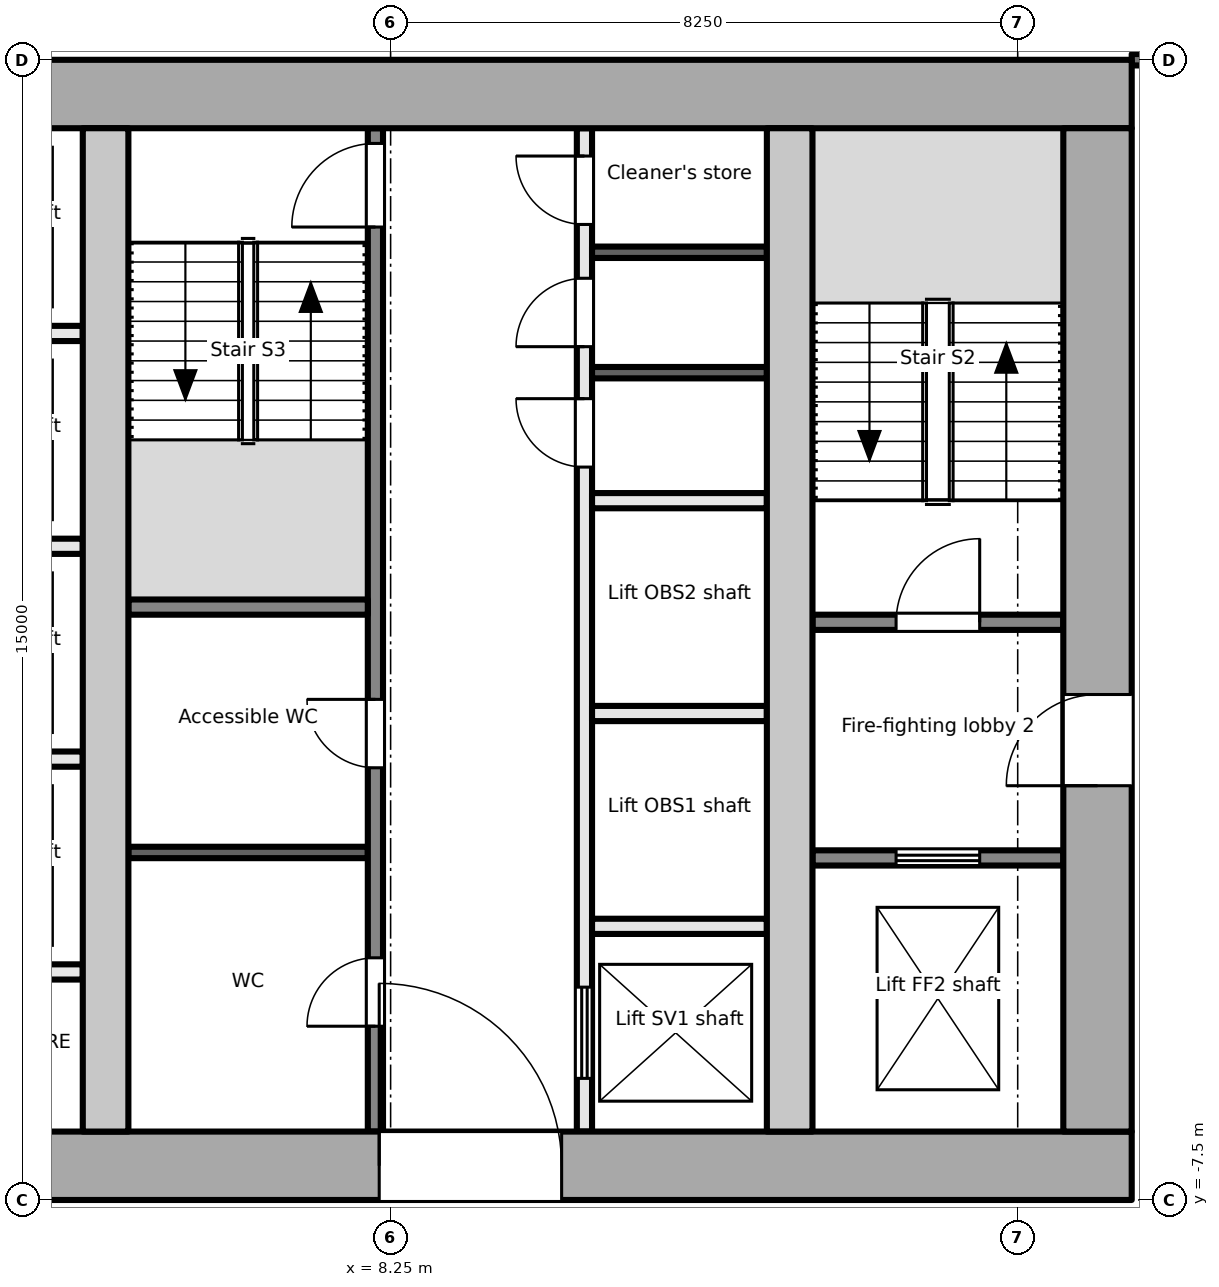
"""IFC4 building model, lengths in metres.
Left out: names, types, materials, properties, quantities, classifications, styles, units other than length and angle.
Written with IfcOpenShell. Run it as: python <this file> out.ifc"""

import sys

from ifc_helpers import new_model, si_unit, direction, frame, frame_2d, origin, place, context, subcontext, project, spatial, rectangle, extrude, element, fill, save


model = new_model("IFC4")
c1 = context("Model", 3, precision=1e-05, world=origin(), true_north=direction((0.0, 1.0)))
c2 = subcontext(c1, "Body", "Model", "MODEL_VIEW")
j1 = project(units=[si_unit("LENGTHUNIT", "METRE"), si_unit("PLANEANGLEUNIT", "RADIAN")], contexts=[c1])
p1 = place(None, origin())
s1 = spatial("IfcSite", under=j1, at=p1, CompositionType="ELEMENT")
p2 = place(p1, origin())
s2 = spatial("IfcBuilding", under=s1, at=p2, CompositionType="ELEMENT")
p3 = place(p2, frame((0.0, 0.0, 217.4)))
s3 = spatial("IfcBuildingStorey", under=s2, at=p3, CompositionType="ELEMENT", Elevation=217.4)
p4 = place(p3, frame((-18.0, -7.05, -0.2), z_axis=(0.0, 0.0, 1.0), x_axis=(1.0, 0.0, 0.0)))
e1 = element("IfcWall", 1, at=p4, inside=s3, PredefinedType="SHEAR", context=c2, shape_type="SweptSolid", body=[
    extrude(rectangle(XDim=36.0, YDim=0.9, at=frame_2d((18.0, 0.0))), origin(), (0.0, 0.0, 1.0), 3.9),
])
p5 = place(p4, frame((4.9, 0.0, 0.2)))
e2 = element("IfcOpeningElement", 2, at=p5, cuts=e1, PredefinedType="OPENING", context=c2, shape_type="SweptSolid", body=[
    extrude(rectangle(XDim=1.8, YDim=2.1, at=frame_2d((0.9, 1.05))), frame((0.0, 0.46, 0.0), z_axis=(0.0, -1.0, 0.0), x_axis=(1.0, 0.0, 0.0)), (0.0, 0.0, 1.0), 0.921),
])
p6 = place(p4, frame((16.8, 0.0, 0.2)))
e3 = element("IfcOpeningElement", 3, at=p6, cuts=e1, PredefinedType="OPENING", context=c2, shape_type="SweptSolid", body=[
    extrude(rectangle(XDim=2.4, YDim=2.1, at=frame_2d((1.2, 1.05))), frame((0.0, 0.46, 0.0), z_axis=(0.0, -1.0, 0.0), x_axis=(1.0, 0.0, 0.0)), (0.0, 0.0, 1.0), 0.921),
])
p7 = place(p4, frame((26.1, 0.0, 0.2)))
e4 = element("IfcOpeningElement", 4, at=p7, cuts=e1, PredefinedType="OPENING", context=c2, shape_type="SweptSolid", body=[
    extrude(rectangle(XDim=2.4, YDim=2.1, at=frame_2d((1.2, 1.05))), frame((0.0, 0.46, 0.0), z_axis=(0.0, -1.0, 0.0), x_axis=(1.0, 0.0, 0.0)), (0.0, 0.0, 1.0), 0.921),
])
p8 = place(p3, frame((-18.0, 7.05, -0.2), z_axis=(0.0, 0.0, 1.0), x_axis=(1.0, 0.0, 0.0)))
e5 = element("IfcWall", 5, at=p8, inside=s3, PredefinedType="SHEAR", context=c2, shape_type="SweptSolid", body=[
    extrude(rectangle(XDim=36.0, YDim=0.9, at=frame_2d((18.0, 0.0))), origin(), (0.0, 0.0, 1.0), 3.9),
])
p9 = place(p3, frame((17.55, -6.6, -0.2), z_axis=(0.0, 0.0, 1.0), x_axis=(0.0, 1.0, 0.0)))
e6 = element("IfcWall", 6, at=p9, inside=s3, PredefinedType="SHEAR", context=c2, shape_type="SweptSolid", body=[
    extrude(rectangle(XDim=13.2, YDim=0.9, at=frame_2d((6.6, 0.0))), origin(), (0.0, 0.0, 1.0), 3.9),
])
p10 = place(p9, frame((4.55, 0.0, 0.2)))
e7 = element("IfcOpeningElement", 7, at=p10, cuts=e6, PredefinedType="OPENING", context=c2, shape_type="SweptSolid", body=[
    extrude(rectangle(XDim=1.2, YDim=2.1, at=frame_2d((0.6, 1.05))), frame((0.0, 0.46, 0.0), z_axis=(0.0, -1.0, 0.0), x_axis=(1.0, 0.0, 0.0)), (0.0, 0.0, 1.0), 0.921),
])
for number, where, z_axis, x_axis in (
    (8, (4.5, -6.6, -0.2), (0.0, 0.0, 1.0), (0.0, 1.0, 0.0)),
    (9, (13.5, -6.6, -0.2), (0.0, 0.0, 1.0), (0.0, 1.0, 0.0)),
):
    element("IfcWall", number, at=place(p3, frame(where, z_axis=z_axis, x_axis=x_axis)), inside=s3, PredefinedType="SHEAR", context=c2, shape_type="SweptSolid", body=[
        extrude(rectangle(XDim=13.2, YDim=0.6, at=frame_2d((6.6, 0.0))), origin(), (0.0, 0.0, 1.0), 3.9),
    ])
p11 = place(p3, frame((13.8, -3.0, 0.0), z_axis=(0.0, 0.0, 1.0), x_axis=(1.0, 0.0, 0.0)))
e10 = element("IfcWall", 10, at=p11, inside=s3, PredefinedType="PARTITIONING", context=c2, shape_type="SweptSolid", body=[
    extrude(rectangle(XDim=3.3, YDim=0.2, at=frame_2d((1.65, 0.0))), origin(), (0.0, 0.0, 1.0), 3.7),
])
p12 = place(p11, frame((1.1, 0.0, 0.0)))
e11 = element("IfcOpeningElement", 11, at=p12, cuts=e10, PredefinedType="OPENING", context=c2, shape_type="SweptSolid", body=[
    extrude(rectangle(XDim=1.1, YDim=2.1, at=frame_2d((0.55, 1.05))), frame((0.0, 0.111, 0.0), z_axis=(0.0, -1.0, 0.0), x_axis=(1.0, 0.0, 0.0)), (0.0, 0.0, 1.0), 0.221),
])
p13 = place(p3, frame((13.8, 0.1, 0.0), z_axis=(0.0, 0.0, 1.0), x_axis=(1.0, 0.0, 0.0)))
e12 = element("IfcWall", 12, at=p13, inside=s3, PredefinedType="PARTITIONING", context=c2, shape_type="SweptSolid", body=[
    extrude(rectangle(XDim=3.3, YDim=0.2, at=frame_2d((1.65, 0.0))), origin(), (0.0, 0.0, 1.0), 3.7),
])
p14 = place(p13, frame((1.1, 0.0, 0.0)))
e13 = element("IfcOpeningElement", 13, at=p14, cuts=e12, PredefinedType="OPENING", context=c2, shape_type="SweptSolid", body=[
    extrude(rectangle(XDim=1.1, YDim=2.1, at=frame_2d((0.55, 1.05))), frame((0.0, 0.111, 0.0), z_axis=(0.0, -1.0, 0.0), x_axis=(1.0, 0.0, 0.0)), (0.0, 0.0, 1.0), 0.221),
])
for number, where, z_axis, x_axis in (
    (14, (1.9, -1.7, 0.0), (0.0, 0.0, 1.0), (1.0, 0.0, 0.0)),
    (15, (1.9, 1.1, 0.0), (0.0, 0.0, 1.0), (1.0, 0.0, 0.0)),
    (16, (1.9, 3.9, 0.0), (0.0, 0.0, 1.0), (1.0, 0.0, 0.0)),
    (17, (1.9, -4.5, 0.0), (0.0, 0.0, 1.0), (1.0, 0.0, 0.0)),
):
    element("IfcWall", number, at=place(p3, frame(where, z_axis=z_axis, x_axis=x_axis)), inside=s3, PredefinedType="PARTITIONING", context=c2, shape_type="SweptSolid", body=[
        extrude(rectangle(XDim=2.3, YDim=0.2, at=frame_2d((1.15, 0.0))), origin(), (0.0, 0.0, 1.0), 3.7),
    ])
p15 = place(p3, frame((8.05, -6.6, 0.0), z_axis=(0.0, 0.0, 1.0), x_axis=(0.0, 1.0, 0.0)))
e18 = element("IfcWall", 18, at=p15, inside=s3, PredefinedType="PARTITIONING", context=c2, shape_type="SweptSolid", body=[
    extrude(rectangle(XDim=13.2, YDim=0.2, at=frame_2d((6.6, 0.0))), origin(), (0.0, 0.0, 1.0), 3.7),
])
p16 = place(p15, frame((1.386, 0.0, 0.0)))
e19 = element("IfcOpeningElement", 19, at=p16, cuts=e18, PredefinedType="OPENING", context=c2, shape_type="SweptSolid", body=[
    extrude(rectangle(XDim=0.9, YDim=2.1, at=frame_2d((0.45, 1.05))), frame((0.0, 0.111, 0.0), z_axis=(0.0, -1.0, 0.0), x_axis=(1.0, 0.0, 0.0)), (0.0, 0.0, 1.0), 0.221),
])
p17 = place(p15, frame((4.786, 0.0, 0.0)))
e20 = element("IfcOpeningElement", 20, at=p17, cuts=e18, PredefinedType="OPENING", context=c2, shape_type="SweptSolid", body=[
    extrude(rectangle(XDim=0.9, YDim=2.1, at=frame_2d((0.45, 1.05))), frame((0.0, 0.111, 0.0), z_axis=(0.0, -1.0, 0.0), x_axis=(1.0, 0.0, 0.0)), (0.0, 0.0, 1.0), 0.221),
])
p18 = place(p15, frame((11.9, 0.0, 0.0)))
e21 = element("IfcOpeningElement", 21, at=p18, cuts=e18, PredefinedType="OPENING", context=c2, shape_type="SweptSolid", body=[
    extrude(rectangle(XDim=1.1, YDim=2.1, at=frame_2d((0.55, 1.05))), frame((0.0, 0.111, 0.0), z_axis=(0.0, -1.0, 0.0), x_axis=(1.0, 0.0, 0.0)), (0.0, 0.0, 1.0), 0.221),
])
p19 = place(p3, frame((10.8, -6.6, 0.0), z_axis=(0.0, 0.0, 1.0), x_axis=(0.0, 1.0, 0.0)))
e22 = element("IfcWall", 22, at=p19, inside=s3, PredefinedType="PARTITIONING", context=c2, shape_type="SweptSolid", body=[
    extrude(rectangle(XDim=13.2, YDim=0.2, at=frame_2d((6.6, 0.0))), origin(), (0.0, 0.0, 1.0), 3.7),
])
p20 = place(p19, frame((0.7, 0.0, 0.0)))
e23 = element("IfcOpeningElement", 23, at=p20, cuts=e22, PredefinedType="OPENING", context=c2, shape_type="SweptSolid", body=[
    extrude(rectangle(XDim=1.2, YDim=2.1, at=frame_2d((0.6, 1.05))), frame((0.0, 0.111, 0.0), z_axis=(0.0, -1.0, 0.0), x_axis=(1.0, 0.0, 0.0)), (0.0, 0.0, 1.0), 0.221),
])
p21 = place(p19, frame((8.742, 0.0, 0.0)))
e24 = element("IfcOpeningElement", 24, at=p21, cuts=e22, PredefinedType="OPENING", context=c2, shape_type="SweptSolid", body=[
    extrude(rectangle(XDim=0.9, YDim=2.1, at=frame_2d((0.45, 1.05))), frame((0.0, 0.111, 0.0), z_axis=(0.0, -1.0, 0.0), x_axis=(1.0, 0.0, 0.0)), (0.0, 0.0, 1.0), 0.221),
])
p22 = place(p19, frame((10.326, 0.0, 0.0)))
e25 = element("IfcOpeningElement", 25, at=p22, cuts=e22, PredefinedType="OPENING", context=c2, shape_type="SweptSolid", body=[
    extrude(rectangle(XDim=0.9, YDim=2.1, at=frame_2d((0.45, 1.05))), frame((0.0, 0.111, 0.0), z_axis=(0.0, -1.0, 0.0), x_axis=(1.0, 0.0, 0.0)), (0.0, 0.0, 1.0), 0.221),
])
p23 = place(p19, frame((11.934, 0.0, 0.0)))
e26 = element("IfcOpeningElement", 26, at=p23, cuts=e22, PredefinedType="OPENING", context=c2, shape_type="SweptSolid", body=[
    extrude(rectangle(XDim=0.9, YDim=2.1, at=frame_2d((0.45, 1.05))), frame((0.0, 0.111, 0.0), z_axis=(0.0, -1.0, 0.0), x_axis=(1.0, 0.0, 0.0)), (0.0, 0.0, 1.0), 0.221),
])
p24 = place(p3, frame((4.8, 0.3, 0.0), z_axis=(0.0, 0.0, 1.0), x_axis=(1.0, 0.0, 0.0)))
e27 = element("IfcWall", 27, at=p24, inside=s3, PredefinedType="PARTITIONING", context=c2, shape_type="SweptSolid", body=[
    extrude(rectangle(XDim=3.15, YDim=0.2, at=frame_2d((1.575, 0.0))), origin(), (0.0, 0.0, 1.0), 3.7),
])
p25 = place(p3, frame((4.8, -2.928, 0.0), z_axis=(0.0, 0.0, 1.0), x_axis=(1.0, 0.0, 0.0)))
e28 = element("IfcWall", 28, at=p25, inside=s3, PredefinedType="PARTITIONING", context=c2, shape_type="SweptSolid", body=[
    extrude(rectangle(XDim=3.15, YDim=0.15, at=frame_2d((1.575, 0.0))), origin(), (0.0, 0.0, 1.0), 3.7),
])
for number, where, z_axis, x_axis in (
    (29, (10.9, -3.9, 0.0), (0.0, 0.0, 1.0), (1.0, 0.0, 0.0)),
    (30, (10.9, -1.1, 0.0), (0.0, 0.0, 1.0), (1.0, 0.0, 0.0)),
    (31, (10.9, 1.7, 0.0), (0.0, 0.0, 1.0), (1.0, 0.0, 0.0)),
):
    element("IfcWall", number, at=place(p3, frame(where, z_axis=z_axis, x_axis=x_axis)), inside=s3, PredefinedType="PARTITIONING", context=c2, shape_type="SweptSolid", body=[
        extrude(rectangle(XDim=2.3, YDim=0.2, at=frame_2d((1.15, 0.0))), origin(), (0.0, 0.0, 1.0), 3.7),
    ])
for number, where, z_axis, x_axis in (
    (32, (10.9, 3.384, 0.0), (0.0, 0.0, 1.0), (1.0, 0.0, 0.0)),
    (33, (10.9, 4.968, 0.0), (0.0, 0.0, 1.0), (1.0, 0.0, 0.0)),
):
    element("IfcWall", number, at=place(p3, frame(where, z_axis=z_axis, x_axis=x_axis)), inside=s3, PredefinedType="PARTITIONING", context=c2, shape_type="SweptSolid", body=[
        extrude(rectangle(XDim=2.3, YDim=0.15, at=frame_2d((1.15, 0.0))), origin(), (0.0, 0.0, 1.0), 3.7),
    ])
p26 = place(p3, frame((18.0, 7.501, 0.0), z_axis=(0.0, 0.0, 1.0), x_axis=(1.0, 0.0, 0.0)))
e34 = element("IfcWall", 34, at=p26, inside=s3, PredefinedType="PARTITIONING", context=c2, shape_type="SweptSolid", body=[
    extrude(rectangle(XDim=2.625, YDim=0.15, at=frame_2d((1.312, 0.0))), origin(), (0.0, 0.0, 1.0), 3.7),
])
p27 = place(p12, origin())
e35 = element("IfcDoor", 35, at=p27, inside=s3, OperationType="DOUBLE_DOOR_SLIDING", PredefinedType="DOOR", context=c2, shape_type="SweptSolid", body=[
    extrude(rectangle(XDim=1.1, YDim=2.1, at=frame_2d((0.55, 1.05))), frame((0.0, 0.025, 0.0), z_axis=(0.0, -1.0, 0.0), x_axis=(1.0, 0.0, 0.0)), (0.0, 0.0, 1.0), 0.05),
])
fill(e11, e35)
p28 = place(p10, origin())
e36 = element("IfcDoor", 36, at=p28, inside=s3, OperationType="SINGLE_SWING_LEFT", PredefinedType="DOOR", context=c2, shape_type="SweptSolid", body=[
    extrude(rectangle(XDim=1.2, YDim=2.1, at=frame_2d((0.6, 1.05))), frame((0.0, 0.025, 0.0), z_axis=(0.0, -1.0, 0.0), x_axis=(1.0, 0.0, 0.0)), (0.0, 0.0, 1.0), 0.05),
])
fill(e7, e36)
p29 = place(p14, origin())
e37 = element("IfcDoor", 37, at=p29, inside=s3, OperationType="SINGLE_SWING_RIGHT", PredefinedType="DOOR", context=c2, shape_type="SweptSolid", body=[
    extrude(rectangle(XDim=1.1, YDim=2.1, at=frame_2d((0.55, 1.05))), frame((0.0, 0.025, 0.0), z_axis=(0.0, -1.0, 0.0), x_axis=(1.0, 0.0, 0.0)), (0.0, 0.0, 1.0), 0.05),
])
fill(e13, e37)
p30 = place(p16, origin())
e38 = element("IfcDoor", 38, at=p30, inside=s3, OperationType="SINGLE_SWING_LEFT", PredefinedType="DOOR", context=c2, shape_type="SweptSolid", body=[
    extrude(rectangle(XDim=0.9, YDim=2.1, at=frame_2d((0.45, 1.05))), frame((0.0, 0.025, 0.0), z_axis=(0.0, -1.0, 0.0), x_axis=(1.0, 0.0, 0.0)), (0.0, 0.0, 1.0), 0.05),
])
fill(e19, e38)
p31 = place(p17, origin())
e39 = element("IfcDoor", 39, at=p31, inside=s3, OperationType="SINGLE_SWING_RIGHT", PredefinedType="DOOR", context=c2, shape_type="SweptSolid", body=[
    extrude(rectangle(XDim=0.9, YDim=2.1, at=frame_2d((0.45, 1.05))), frame((0.0, 0.025, 0.0), z_axis=(0.0, -1.0, 0.0), x_axis=(1.0, 0.0, 0.0)), (0.0, 0.0, 1.0), 0.05),
])
fill(e20, e39)
p32 = place(p18, origin())
e40 = element("IfcDoor", 40, at=p32, inside=s3, OperationType="SINGLE_SWING_LEFT", PredefinedType="DOOR", context=c2, shape_type="SweptSolid", body=[
    extrude(rectangle(XDim=1.1, YDim=2.1, at=frame_2d((0.55, 1.05))), frame((0.0, 0.025, 0.0), z_axis=(0.0, -1.0, 0.0), x_axis=(1.0, 0.0, 0.0)), (0.0, 0.0, 1.0), 0.05),
])
fill(e21, e40)
p33 = place(p7, origin())
e41 = element("IfcDoor", 41, at=p33, inside=s3, OperationType="DOUBLE_DOOR_DOUBLE_SWING", PredefinedType="DOOR", context=c2, shape_type="SweptSolid", body=[
    extrude(rectangle(XDim=2.4, YDim=2.1, at=frame_2d((1.2, 1.05))), frame((0.0, 0.025, 0.0), z_axis=(0.0, -1.0, 0.0), x_axis=(1.0, 0.0, 0.0)), (0.0, 0.0, 1.0), 0.05),
])
fill(e4, e41)
p34 = place(p20, origin())
e42 = element("IfcDoor", 42, at=p34, inside=s3, OperationType="DOUBLE_DOOR_SLIDING", PredefinedType="DOOR", context=c2, shape_type="SweptSolid", body=[
    extrude(rectangle(XDim=1.2, YDim=2.1, at=frame_2d((0.6, 1.05))), frame((0.0, 0.025, 0.0), z_axis=(0.0, -1.0, 0.0), x_axis=(1.0, 0.0, 0.0)), (0.0, 0.0, 1.0), 0.05),
])
fill(e23, e42)
p35 = place(p21, origin())
e43 = element("IfcDoor", 43, at=p35, inside=s3, OperationType="SINGLE_SWING_RIGHT", PredefinedType="DOOR", context=c2, shape_type="SweptSolid", body=[
    extrude(rectangle(XDim=0.9, YDim=2.1, at=frame_2d((0.45, 1.05))), frame((0.0, 0.025, 0.0), z_axis=(0.0, -1.0, 0.0), x_axis=(1.0, 0.0, 0.0)), (0.0, 0.0, 1.0), 0.05),
])
fill(e24, e43)
p36 = place(p22, origin())
e44 = element("IfcDoor", 44, at=p36, inside=s3, OperationType="SINGLE_SWING_LEFT", PredefinedType="DOOR", context=c2, shape_type="SweptSolid", body=[
    extrude(rectangle(XDim=0.9, YDim=2.1, at=frame_2d((0.45, 1.05))), frame((0.0, 0.025, 0.0), z_axis=(0.0, -1.0, 0.0), x_axis=(1.0, 0.0, 0.0)), (0.0, 0.0, 1.0), 0.05),
])
fill(e25, e44)
p37 = place(p23, origin())
e45 = element("IfcDoor", 45, at=p37, inside=s3, OperationType="SINGLE_SWING_RIGHT", PredefinedType="DOOR", context=c2, shape_type="SweptSolid", body=[
    extrude(rectangle(XDim=0.9, YDim=2.1, at=frame_2d((0.45, 1.05))), frame((0.0, 0.025, 0.0), z_axis=(0.0, -1.0, 0.0), x_axis=(1.0, 0.0, 0.0)), (0.0, 0.0, 1.0), 0.05),
])
fill(e26, e45)
save(model, sys.argv[1])
